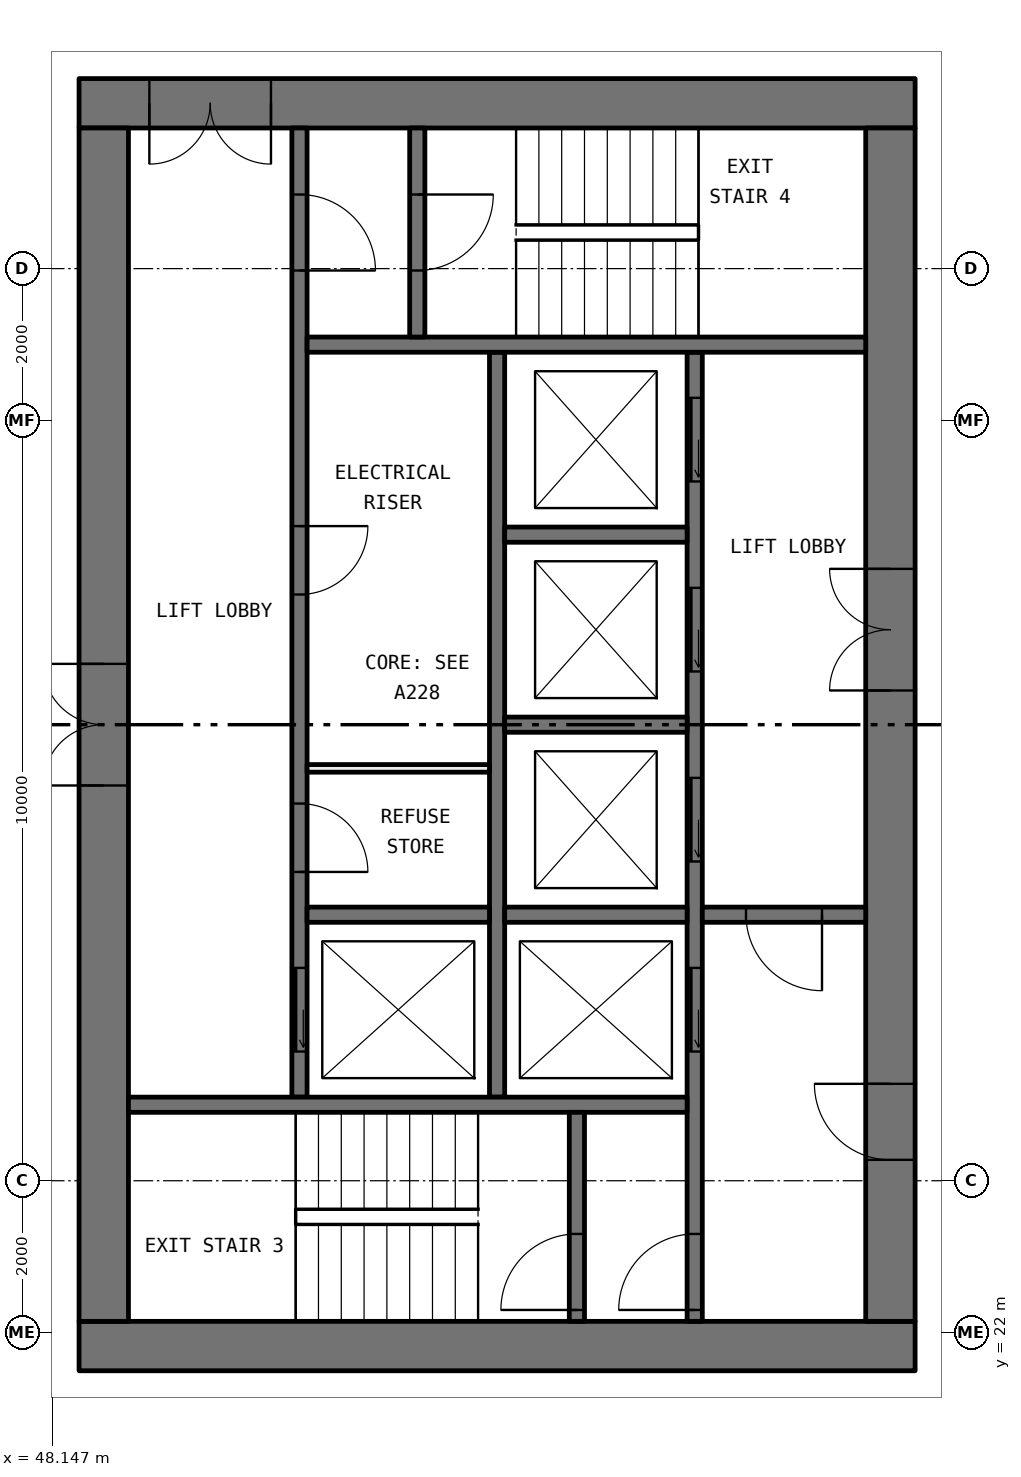
"""IFC4 building model, lengths in metres.
Left out: names, types, materials, properties, quantities, classifications, styles, units other than length and angle.
Written with IfcOpenShell. Run it as: python <this file> out.ifc"""

import sys

from ifc_helpers import new_model, si_unit, direction, frame, frame_2d, origin, place, context, subcontext, project, spatial, rectangle, extrude, element, fill, save


model = new_model("IFC4")
c1 = context("Model", 3, precision=1e-05, world=origin(), true_north=direction((0.0, 1.0)))
c2 = subcontext(c1, "Body", "Model", "MODEL_VIEW")
j1 = project(units=[si_unit("LENGTHUNIT", "METRE"), si_unit("PLANEANGLEUNIT", "RADIAN")], contexts=[c1])
p1 = place(None, origin())
s1 = spatial("IfcSite", under=j1, at=p1, CompositionType="ELEMENT")
p2 = place(p1, origin())
s2 = spatial("IfcBuilding", under=s1, at=p2, CompositionType="ELEMENT")
p3 = place(p2, frame((0.0, 0.0, 106.95)))
s3 = spatial("IfcBuildingStorey", under=s2, at=p3, CompositionType="ELEMENT", Elevation=106.95)
p4 = place(p3, frame((59.5, 21.825, 0.0), z_axis=(0.0, 0.0, 1.0), x_axis=(-1.0, 0.0, 0.0)))
e1 = element("IfcWall", 1, at=p4, inside=s3, PredefinedType="SHEAR", context=c2, shape_type="SweptSolid", body=[
    extrude(rectangle(XDim=11.0, YDim=0.65, at=frame_2d((5.5, 0.0))), origin(), (0.0, 0.0, 1.0), 3.05),
])
p5 = place(p3, frame((59.5, 38.175, 0.0), z_axis=(0.0, 0.0, 1.0), x_axis=(-1.0, 0.0, 0.0)))
e2 = element("IfcWall", 2, at=p5, inside=s3, PredefinedType="SHEAR", context=c2, shape_type="SweptSolid", body=[
    extrude(rectangle(XDim=11.0, YDim=0.65, at=frame_2d((5.5, 0.0))), origin(), (0.0, 0.0, 1.0), 3.05),
])
p6 = place(p5, frame((8.475, 0.0, 0.0)))
e3 = element("IfcOpeningElement", 3, at=p6, cuts=e2, PredefinedType="OPENING", context=c2, shape_type="SweptSolid", body=[
    extrude(rectangle(XDim=1.6, YDim=2.1, at=frame_2d((0.8, 1.05))), frame((0.0, 0.335, 0.0), z_axis=(0.0, -1.0, 0.0), x_axis=(1.0, 0.0, 0.0)), (0.0, 0.0, 1.0), 0.67),
])
p7 = place(p3, frame((59.175, 22.15, 0.0), z_axis=(0.0, 0.0, 1.0), x_axis=(0.0, 1.0, 0.0)))
e4 = element("IfcWall", 4, at=p7, inside=s3, PredefinedType="SHEAR", context=c2, shape_type="SweptSolid", body=[
    extrude(rectangle(XDim=15.7, YDim=0.65, at=frame_2d((7.85, 0.0))), origin(), (0.0, 0.0, 1.0), 3.05),
])
p8 = place(p7, frame((8.3, 0.0, 0.0)))
e5 = element("IfcOpeningElement", 5, at=p8, cuts=e4, PredefinedType="OPENING", context=c2, shape_type="SweptSolid", body=[
    extrude(rectangle(XDim=1.6, YDim=2.1, at=frame_2d((0.8, 1.05))), frame((0.0, 0.335, 0.0), z_axis=(0.0, -1.0, 0.0), x_axis=(1.0, 0.0, 0.0)), (0.0, 0.0, 1.0), 0.67),
])
p9 = place(p7, frame((2.125, 0.0, 0.0)))
e6 = element("IfcOpeningElement", 6, at=p9, cuts=e4, PredefinedType="OPENING", context=c2, shape_type="SweptSolid", body=[
    extrude(rectangle(XDim=1.0, YDim=2.1, at=frame_2d((0.5, 1.05))), frame((0.0, 0.335, 0.0), z_axis=(0.0, -1.0, 0.0), x_axis=(1.0, 0.0, 0.0)), (0.0, 0.0, 1.0), 0.67),
])
p10 = place(p3, frame((48.825, 22.15, 0.0), z_axis=(0.0, 0.0, 1.0), x_axis=(0.0, 1.0, 0.0)))
e7 = element("IfcWall", 7, at=p10, inside=s3, PredefinedType="SHEAR", context=c2, shape_type="SweptSolid", body=[
    extrude(rectangle(XDim=15.7, YDim=0.65, at=frame_2d((7.85, 0.0))), origin(), (0.0, 0.0, 1.0), 3.05),
])
p11 = place(p10, frame((7.05, 0.0, 0.0)))
e8 = element("IfcOpeningElement", 8, at=p11, cuts=e7, PredefinedType="OPENING", context=c2, shape_type="SweptSolid", body=[
    extrude(rectangle(XDim=1.6, YDim=2.1, at=frame_2d((0.8, 1.05))), frame((0.0, 0.335, 0.0), z_axis=(0.0, -1.0, 0.0), x_axis=(1.0, 0.0, 0.0)), (0.0, 0.0, 1.0), 0.67),
])
p12 = place(p3, frame((56.6, 22.15, 0.0), z_axis=(0.0, 0.0, 1.0), x_axis=(0.0, 1.0, 0.0)))
e9 = element("IfcWall", 9, at=p12, inside=s3, PredefinedType="SOLIDWALL", context=c2, shape_type="SweptSolid", body=[
    extrude(rectangle(XDim=12.75, YDim=0.2, at=frame_2d((6.375, 0.0))), origin(), (0.0, 0.0, 1.0), 3.05),
])
p13 = place(p12, frame((3.55, 0.0, 0.0)))
e10 = element("IfcOpeningElement", 10, at=p13, cuts=e9, PredefinedType="OPENING", context=c2, shape_type="SweptSolid", body=[
    extrude(rectangle(XDim=1.1, YDim=2.1, at=frame_2d((0.55, 1.05))), frame((0.0, 0.11, 0.0), z_axis=(0.0, -1.0, 0.0), x_axis=(1.0, 0.0, 0.0)), (0.0, 0.0, 1.0), 0.22),
])
p14 = place(p12, frame((6.05, 0.0, 0.0)))
e11 = element("IfcOpeningElement", 11, at=p14, cuts=e9, PredefinedType="OPENING", context=c2, shape_type="SweptSolid", body=[
    extrude(rectangle(XDim=1.1, YDim=2.1, at=frame_2d((0.55, 1.05))), frame((0.0, 0.11, 0.0), z_axis=(0.0, -1.0, 0.0), x_axis=(1.0, 0.0, 0.0)), (0.0, 0.0, 1.0), 0.22),
])
p15 = place(p12, frame((8.55, 0.0, 0.0)))
e12 = element("IfcOpeningElement", 12, at=p15, cuts=e9, PredefinedType="OPENING", context=c2, shape_type="SweptSolid", body=[
    extrude(rectangle(XDim=1.1, YDim=2.1, at=frame_2d((0.55, 1.05))), frame((0.0, 0.11, 0.0), z_axis=(0.0, -1.0, 0.0), x_axis=(1.0, 0.0, 0.0)), (0.0, 0.0, 1.0), 0.22),
])
p16 = place(p12, frame((11.05, 0.0, 0.0)))
e13 = element("IfcOpeningElement", 13, at=p16, cuts=e9, PredefinedType="OPENING", context=c2, shape_type="SweptSolid", body=[
    extrude(rectangle(XDim=1.1, YDim=2.1, at=frame_2d((0.55, 1.05))), frame((0.0, 0.11, 0.0), z_axis=(0.0, -1.0, 0.0), x_axis=(1.0, 0.0, 0.0)), (0.0, 0.0, 1.0), 0.22),
])
p17 = place(p12, frame((0.15, 0.0, 0.0)))
e14 = element("IfcOpeningElement", 14, at=p17, cuts=e9, PredefinedType="OPENING", context=c2, shape_type="SweptSolid", body=[
    extrude(rectangle(XDim=1.0, YDim=2.1, at=frame_2d((0.5, 1.05))), frame((0.0, 0.11, 0.0), z_axis=(0.0, -1.0, 0.0), x_axis=(1.0, 0.0, 0.0)), (0.0, 0.0, 1.0), 0.22),
])
p18 = place(p3, frame((51.4, 25.1, 0.0), z_axis=(0.0, 0.0, 1.0), x_axis=(0.0, 1.0, 0.0)))
e15 = element("IfcWall", 15, at=p18, inside=s3, PredefinedType="SOLIDWALL", context=c2, shape_type="SweptSolid", body=[
    extrude(rectangle(XDim=12.75, YDim=0.2, at=frame_2d((6.375, 0.0))), origin(), (0.0, 0.0, 1.0), 3.05),
])
p19 = place(p18, frame((0.6, 0.0, 0.0)))
e16 = element("IfcOpeningElement", 16, at=p19, cuts=e15, PredefinedType="OPENING", context=c2, shape_type="SweptSolid", body=[
    extrude(rectangle(XDim=1.1, YDim=2.1, at=frame_2d((0.55, 1.05))), frame((0.0, 0.11, 0.0), z_axis=(0.0, -1.0, 0.0), x_axis=(1.0, 0.0, 0.0)), (0.0, 0.0, 1.0), 0.22),
])
p20 = place(p18, frame((10.875, 0.0, 0.0)))
e17 = element("IfcOpeningElement", 17, at=p20, cuts=e15, PredefinedType="OPENING", context=c2, shape_type="SweptSolid", body=[
    extrude(rectangle(XDim=1.0, YDim=2.1, at=frame_2d((0.5, 1.05))), frame((0.0, 0.11, 0.0), z_axis=(0.0, -1.0, 0.0), x_axis=(1.0, 0.0, 0.0)), (0.0, 0.0, 1.0), 0.22),
])
p21 = place(p18, frame((2.962, 0.0, 0.0)))
e18 = element("IfcOpeningElement", 18, at=p21, cuts=e15, PredefinedType="OPENING", context=c2, shape_type="SweptSolid", body=[
    extrude(rectangle(XDim=0.9, YDim=2.1, at=frame_2d((0.45, 1.05))), frame((0.0, 0.11, 0.0), z_axis=(0.0, -1.0, 0.0), x_axis=(1.0, 0.0, 0.0)), (0.0, 0.0, 1.0), 0.22),
])
p22 = place(p18, frame((6.613, 0.0, 0.0)))
e19 = element("IfcOpeningElement", 19, at=p22, cuts=e15, PredefinedType="OPENING", context=c2, shape_type="SweptSolid", body=[
    extrude(rectangle(XDim=0.9, YDim=2.1, at=frame_2d((0.45, 1.05))), frame((0.0, 0.11, 0.0), z_axis=(0.0, -1.0, 0.0), x_axis=(1.0, 0.0, 0.0)), (0.0, 0.0, 1.0), 0.22),
])
p23 = place(p3, frame((54.0, 25.1, 0.0), z_axis=(0.0, 0.0, 1.0), x_axis=(0.0, 1.0, 0.0)))
e20 = element("IfcWall", 20, at=p23, inside=s3, PredefinedType="SOLIDWALL", context=c2, shape_type="SweptSolid", body=[
    extrude(rectangle(XDim=9.8, YDim=0.2, at=frame_2d((4.9, 0.0))), origin(), (0.0, 0.0, 1.0), 3.05),
])
for number, where, z_axis, x_axis in (
    (21, (56.5, 25.0, 0.0), (0.0, 0.0, 1.0), (-1.0, 0.0, 0.0)),
    (22, (58.85, 35.0, 0.0), (0.0, 0.0, 1.0), (-1.0, 0.0, 0.0)),
):
    element("IfcWall", number, at=place(p3, frame(where, z_axis=z_axis, x_axis=x_axis)), inside=s3, PredefinedType="SOLIDWALL", context=c2, shape_type="SweptSolid", body=[
        extrude(rectangle(XDim=7.35, YDim=0.2, at=frame_2d((3.675, 0.0))), origin(), (0.0, 0.0, 1.0), 3.05),
    ])
p24 = place(p3, frame((58.85, 27.5, 0.0), z_axis=(0.0, 0.0, 1.0), x_axis=(-1.0, 0.0, 0.0)))
e23 = element("IfcWall", 23, at=p24, inside=s3, PredefinedType="SOLIDWALL", context=c2, shape_type="SweptSolid", body=[
    extrude(rectangle(XDim=2.15, YDim=0.2, at=frame_2d((1.075, 0.0))), origin(), (0.0, 0.0, 1.0), 3.05),
])
p25 = place(p24, frame((0.575, 0.0, 0.0)))
e24 = element("IfcOpeningElement", 24, at=p25, cuts=e23, PredefinedType="OPENING", context=c2, shape_type="SweptSolid", body=[
    extrude(rectangle(XDim=1.0, YDim=2.1, at=frame_2d((0.5, 1.05))), frame((0.0, 0.11, 0.0), z_axis=(0.0, -1.0, 0.0), x_axis=(1.0, 0.0, 0.0)), (0.0, 0.0, 1.0), 0.22),
])
p26 = place(p3, frame((55.05, 22.15, 0.0), z_axis=(0.0, 0.0, 1.0), x_axis=(0.0, 1.0, 0.0)))
e25 = element("IfcWall", 25, at=p26, inside=s3, PredefinedType="SOLIDWALL", context=c2, shape_type="SweptSolid", body=[
    extrude(rectangle(XDim=2.75, YDim=0.2, at=frame_2d((1.375, 0.0))), origin(), (0.0, 0.0, 1.0), 3.05),
])
p27 = place(p26, frame((0.15, 0.0, 0.0)))
e26 = element("IfcOpeningElement", 26, at=p27, cuts=e25, PredefinedType="OPENING", context=c2, shape_type="SweptSolid", body=[
    extrude(rectangle(XDim=1.0, YDim=2.1, at=frame_2d((0.5, 1.05))), frame((0.0, 0.11, 0.0), z_axis=(0.0, -1.0, 0.0), x_axis=(1.0, 0.0, 0.0)), (0.0, 0.0, 1.0), 0.22),
])
p28 = place(p3, frame((52.95, 35.1, 0.0), z_axis=(0.0, 0.0, 1.0), x_axis=(0.0, 1.0, 0.0)))
e27 = element("IfcWall", 27, at=p28, inside=s3, PredefinedType="SOLIDWALL", context=c2, shape_type="SweptSolid", body=[
    extrude(rectangle(XDim=2.75, YDim=0.2, at=frame_2d((1.375, 0.0))), origin(), (0.0, 0.0, 1.0), 3.05),
])
p29 = place(p28, frame((0.875, 0.0, 0.0)))
e28 = element("IfcOpeningElement", 28, at=p29, cuts=e27, PredefinedType="OPENING", context=c2, shape_type="SweptSolid", body=[
    extrude(rectangle(XDim=1.0, YDim=2.1, at=frame_2d((0.5, 1.05))), frame((0.0, 0.11, 0.0), z_axis=(0.0, -1.0, 0.0), x_axis=(1.0, 0.0, 0.0)), (0.0, 0.0, 1.0), 0.22),
])
for number, where, z_axis, x_axis in (
    (29, (56.5, 27.5, 0.0), (0.0, 0.0, 1.0), (-1.0, 0.0, 0.0)),
    (30, (56.5, 30.0, 0.0), (0.0, 0.0, 1.0), (-1.0, 0.0, 0.0)),
    (31, (56.5, 32.5, 0.0), (0.0, 0.0, 1.0), (-1.0, 0.0, 0.0)),
    (32, (53.9, 27.5, 0.0), (0.0, 0.0, 1.0), (-1.0, 0.0, 0.0)),
):
    element("IfcWall", number, at=place(p3, frame(where, z_axis=z_axis, x_axis=x_axis)), inside=s3, PredefinedType="SOLIDWALL", context=c2, shape_type="SweptSolid", body=[
        extrude(rectangle(XDim=2.4, YDim=0.2, at=frame_2d((1.2, 0.0))), origin(), (0.0, 0.0, 1.0), 3.05),
    ])
p30 = place(p3, frame((53.9, 29.425, 0.0), z_axis=(0.0, 0.0, 1.0), x_axis=(-1.0, 0.0, 0.0)))
e33 = element("IfcWall", 33, at=p30, inside=s3, PredefinedType="PARTITIONING", context=c2, shape_type="SweptSolid", body=[
    extrude(rectangle(XDim=2.4, YDim=0.1, at=frame_2d((1.2, 0.0))), origin(), (0.0, 0.0, 1.0), 3.05),
])
p31 = place(p19, origin())
e34 = element("IfcDoor", 34, at=p31, inside=s3, OperationType="SLIDING_TO_LEFT", PredefinedType="DOOR", context=c2, shape_type="SweptSolid", body=[
    extrude(rectangle(XDim=1.1, YDim=2.1, at=frame_2d((0.55, 1.05))), frame((0.0, 0.025, 0.0), z_axis=(0.0, -1.0, 0.0), x_axis=(1.0, 0.0, 0.0)), (0.0, 0.0, 1.0), 0.05),
])
fill(e16, e34)
p32 = place(p13, origin())
e35 = element("IfcDoor", 35, at=p32, inside=s3, OperationType="SLIDING_TO_LEFT", PredefinedType="DOOR", context=c2, shape_type="SweptSolid", body=[
    extrude(rectangle(XDim=1.1, YDim=2.1, at=frame_2d((0.55, 1.05))), frame((0.0, 0.025, 0.0), z_axis=(0.0, -1.0, 0.0), x_axis=(1.0, 0.0, 0.0)), (0.0, 0.0, 1.0), 0.05),
])
fill(e10, e35)
p33 = place(p14, origin())
e36 = element("IfcDoor", 36, at=p33, inside=s3, OperationType="SLIDING_TO_LEFT", PredefinedType="DOOR", context=c2, shape_type="SweptSolid", body=[
    extrude(rectangle(XDim=1.1, YDim=2.1, at=frame_2d((0.55, 1.05))), frame((0.0, 0.025, 0.0), z_axis=(0.0, -1.0, 0.0), x_axis=(1.0, 0.0, 0.0)), (0.0, 0.0, 1.0), 0.05),
])
fill(e11, e36)
p34 = place(p15, origin())
e37 = element("IfcDoor", 37, at=p34, inside=s3, OperationType="SLIDING_TO_LEFT", PredefinedType="DOOR", context=c2, shape_type="SweptSolid", body=[
    extrude(rectangle(XDim=1.1, YDim=2.1, at=frame_2d((0.55, 1.05))), frame((0.0, 0.025, 0.0), z_axis=(0.0, -1.0, 0.0), x_axis=(1.0, 0.0, 0.0)), (0.0, 0.0, 1.0), 0.05),
])
fill(e12, e37)
p35 = place(p16, origin())
e38 = element("IfcDoor", 38, at=p35, inside=s3, OperationType="SLIDING_TO_LEFT", PredefinedType="DOOR", context=c2, shape_type="SweptSolid", body=[
    extrude(rectangle(XDim=1.1, YDim=2.1, at=frame_2d((0.55, 1.05))), frame((0.0, 0.025, 0.0), z_axis=(0.0, -1.0, 0.0), x_axis=(1.0, 0.0, 0.0)), (0.0, 0.0, 1.0), 0.05),
])
fill(e13, e38)
p36 = place(p27, origin())
e39 = element("IfcDoor", 39, at=p36, inside=s3, OperationType="SINGLE_SWING_RIGHT", PredefinedType="DOOR", context=c2, shape_type="SweptSolid", body=[
    extrude(rectangle(XDim=1.0, YDim=2.1, at=frame_2d((0.5, 1.05))), frame((0.0, 0.025, 0.0), z_axis=(0.0, -1.0, 0.0), x_axis=(1.0, 0.0, 0.0)), (0.0, 0.0, 1.0), 0.05),
])
fill(e26, e39)
p37 = place(p17, origin())
e40 = element("IfcDoor", 40, at=p37, inside=s3, OperationType="SINGLE_SWING_RIGHT", PredefinedType="DOOR", context=c2, shape_type="SweptSolid", body=[
    extrude(rectangle(XDim=1.0, YDim=2.1, at=frame_2d((0.5, 1.05))), frame((0.0, 0.025, 0.0), z_axis=(0.0, -1.0, 0.0), x_axis=(1.0, 0.0, 0.0)), (0.0, 0.0, 1.0), 0.05),
])
fill(e14, e40)
p38 = place(p20, frame((1.0, 0.0, 0.0), x_axis=(-1.0, 0.0, 0.0)))
e41 = element("IfcDoor", 41, at=p38, inside=s3, OperationType="SINGLE_SWING_LEFT", PredefinedType="DOOR", context=c2, shape_type="SweptSolid", body=[
    extrude(rectangle(XDim=1.0, YDim=2.1, at=frame_2d((0.5, 1.05))), frame((0.0, 0.025, 0.0), z_axis=(0.0, -1.0, 0.0), x_axis=(1.0, 0.0, 0.0)), (0.0, 0.0, 1.0), 0.05),
])
fill(e17, e41)
p39 = place(p29, frame((1.0, 0.0, 0.0), x_axis=(-1.0, 0.0, 0.0)))
e42 = element("IfcDoor", 42, at=p39, inside=s3, OperationType="SINGLE_SWING_RIGHT", PredefinedType="DOOR", context=c2, shape_type="SweptSolid", body=[
    extrude(rectangle(XDim=1.0, YDim=2.1, at=frame_2d((0.5, 1.05))), frame((0.0, 0.025, 0.0), z_axis=(0.0, -1.0, 0.0), x_axis=(1.0, 0.0, 0.0)), (0.0, 0.0, 1.0), 0.05),
])
fill(e28, e42)
p40 = place(p25, origin())
e43 = element("IfcDoor", 43, at=p40, inside=s3, OperationType="SINGLE_SWING_RIGHT", PredefinedType="DOOR", context=c2, shape_type="SweptSolid", body=[
    extrude(rectangle(XDim=1.0, YDim=2.1, at=frame_2d((0.5, 1.05))), frame((0.0, 0.025, 0.0), z_axis=(0.0, -1.0, 0.0), x_axis=(1.0, 0.0, 0.0)), (0.0, 0.0, 1.0), 0.05),
])
fill(e24, e43)
p41 = place(p8, origin())
e44 = element("IfcDoor", 44, at=p41, inside=s3, OperationType="DOUBLE_DOOR_SINGLE_SWING", PredefinedType="DOOR", context=c2, shape_type="SweptSolid", body=[
    extrude(rectangle(XDim=1.6, YDim=2.1, at=frame_2d((0.8, 1.05))), frame((0.0, 0.025, 0.0), z_axis=(0.0, -1.0, 0.0), x_axis=(1.0, 0.0, 0.0)), (0.0, 0.0, 1.0), 0.05),
])
fill(e5, e44)
p42 = place(p9, origin())
e45 = element("IfcDoor", 45, at=p42, inside=s3, OperationType="SINGLE_SWING_LEFT", PredefinedType="DOOR", context=c2, shape_type="SweptSolid", body=[
    extrude(rectangle(XDim=1.0, YDim=2.1, at=frame_2d((0.5, 1.05))), frame((0.0, 0.025, 0.0), z_axis=(0.0, -1.0, 0.0), x_axis=(1.0, 0.0, 0.0)), (0.0, 0.0, 1.0), 0.05),
])
fill(e6, e45)
p43 = place(p6, origin())
e46 = element("IfcDoor", 46, at=p43, inside=s3, OperationType="DOUBLE_DOOR_SINGLE_SWING", PredefinedType="DOOR", context=c2, shape_type="SweptSolid", body=[
    extrude(rectangle(XDim=1.6, YDim=2.1, at=frame_2d((0.8, 1.05))), frame((0.0, 0.025, 0.0), z_axis=(0.0, -1.0, 0.0), x_axis=(1.0, 0.0, 0.0)), (0.0, 0.0, 1.0), 0.05),
])
fill(e3, e46)
p44 = place(p11, origin())
e47 = element("IfcDoor", 47, at=p44, inside=s3, OperationType="DOUBLE_DOOR_SINGLE_SWING", PredefinedType="DOOR", context=c2, shape_type="SweptSolid", body=[
    extrude(rectangle(XDim=1.6, YDim=2.1, at=frame_2d((0.8, 1.05))), frame((0.0, 0.025, 0.0), z_axis=(0.0, -1.0, 0.0), x_axis=(1.0, 0.0, 0.0)), (0.0, 0.0, 1.0), 0.05),
])
fill(e8, e47)
p45 = place(p21, frame((0.9, 0.0, 0.0), x_axis=(-1.0, 0.0, 0.0)))
e48 = element("IfcDoor", 48, at=p45, inside=s3, OperationType="SINGLE_SWING_LEFT", PredefinedType="DOOR", context=c2, shape_type="SweptSolid", body=[
    extrude(rectangle(XDim=0.9, YDim=2.1, at=frame_2d((0.45, 1.05))), frame((0.0, 0.025, 0.0), z_axis=(0.0, -1.0, 0.0), x_axis=(1.0, 0.0, 0.0)), (0.0, 0.0, 1.0), 0.05),
])
fill(e18, e48)
p46 = place(p22, frame((0.9, 0.0, 0.0), x_axis=(-1.0, 0.0, 0.0)))
e49 = element("IfcDoor", 49, at=p46, inside=s3, OperationType="SINGLE_SWING_RIGHT", PredefinedType="DOOR", context=c2, shape_type="SweptSolid", body=[
    extrude(rectangle(XDim=0.9, YDim=2.1, at=frame_2d((0.45, 1.05))), frame((0.0, 0.025, 0.0), z_axis=(0.0, -1.0, 0.0), x_axis=(1.0, 0.0, 0.0)), (0.0, 0.0, 1.0), 0.05),
])
fill(e19, e49)
save(model, sys.argv[1])
